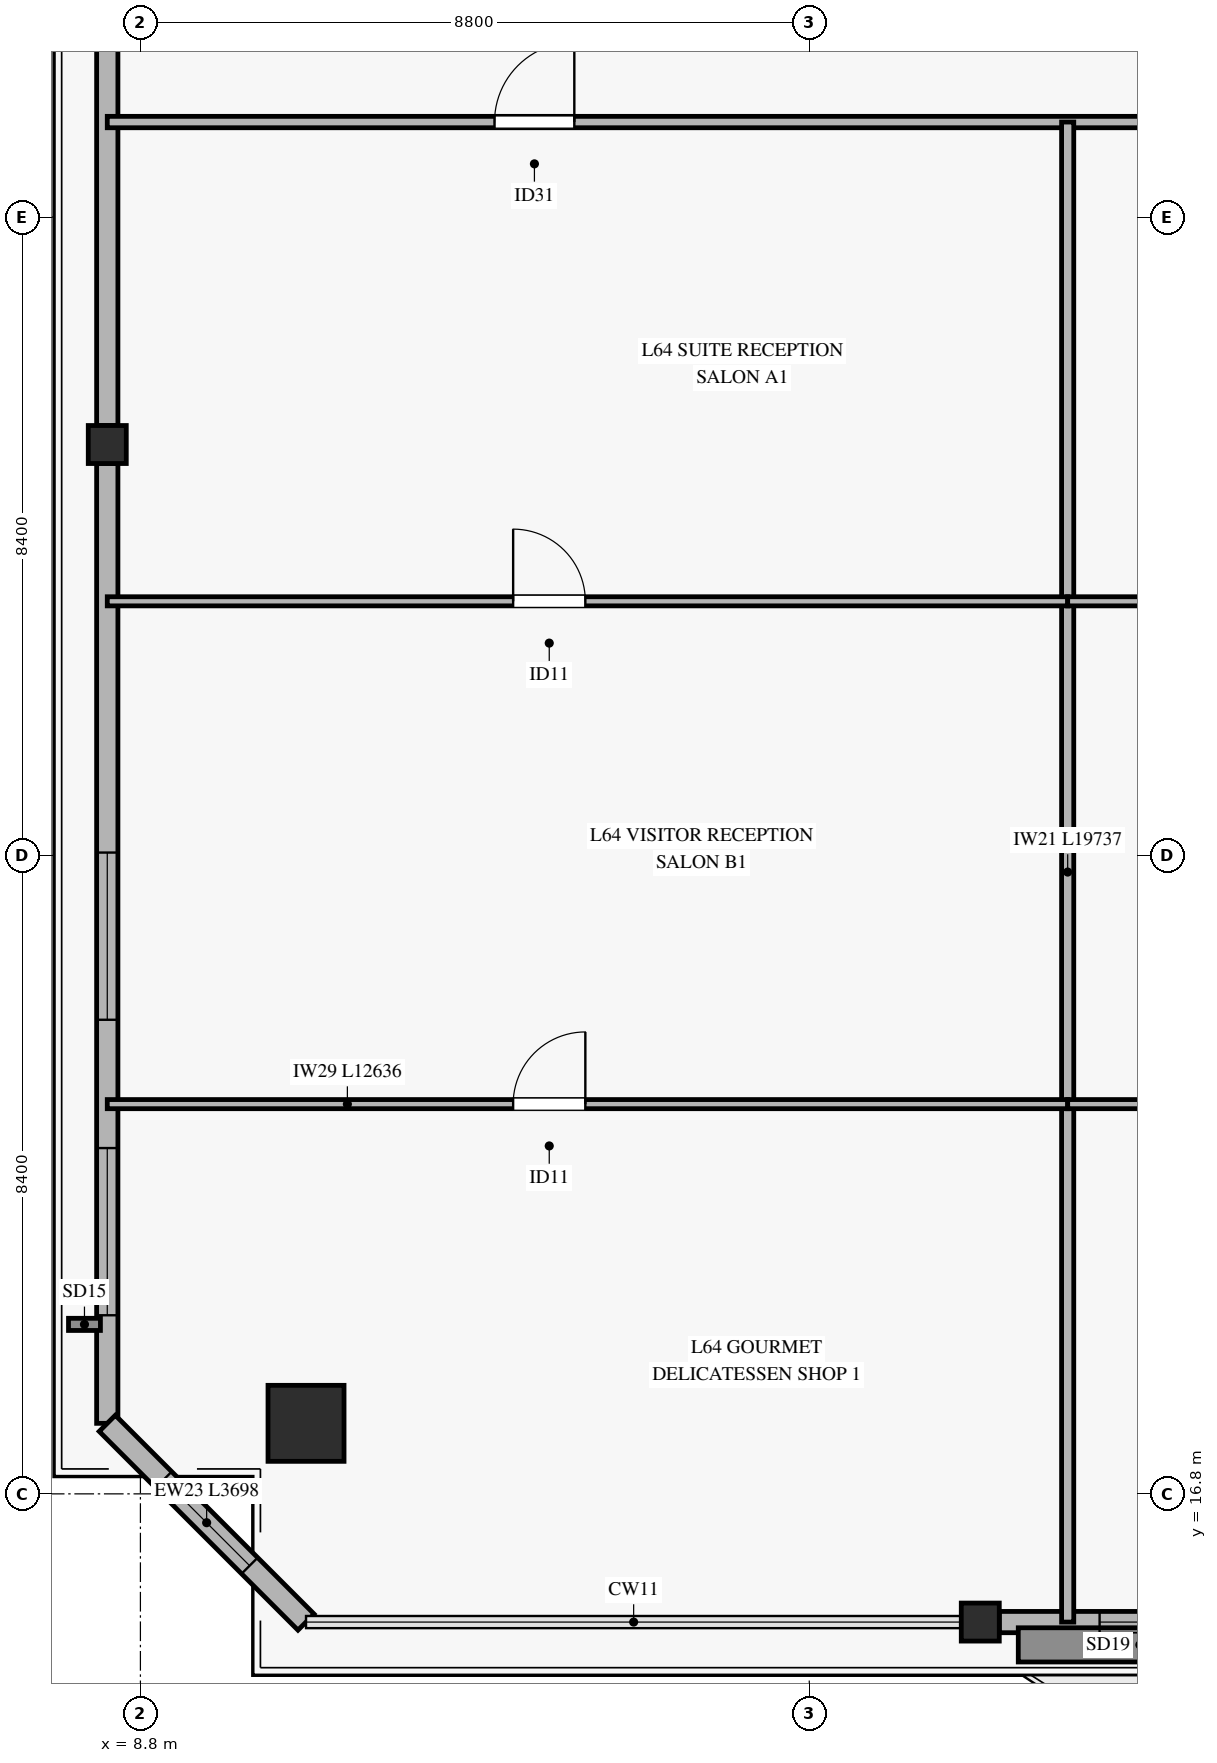
"""IFC4 building model, lengths in metres.
Left out: names, types, materials, properties, quantities, classifications, styles, units other than length and angle.
Written with IfcOpenShell. Run it as: python <this file> out.ifc"""

import sys

from ifc_helpers import new_model, si_unit, direction, frame, frame_2d, origin, origin_2d, place, context, subcontext, project, spatial, rectangle, hollow_rectangle, extrude, source, transform, mapped, element, fill, save


model = new_model("IFC4")
c1 = context("Model", 3, precision=1e-05, world=origin(), true_north=direction((0.0, 1.0)))
c2 = subcontext(c1, "Body", "Model", "MODEL_VIEW")
j1 = project(units=[si_unit("LENGTHUNIT", "METRE"), si_unit("PLANEANGLEUNIT", "RADIAN")], contexts=[c1])
p1 = place(None, origin())
s1 = spatial("IfcSite", under=j1, at=p1, CompositionType="ELEMENT")
p2 = place(p1, origin())
s2 = spatial("IfcBuilding", under=s1, at=p2, CompositionType="ELEMENT")
p3 = place(p2, frame((0.0, 0.0, 251.9)))
s3 = spatial("IfcBuildingStorey", under=s2, at=p3, CompositionType="ELEMENT", Elevation=251.9)
m1 = source(origin(), c2, "Body", "SweptSolid", [
    extrude(hollow_rectangle(XDim=1.0, YDim=1.0, WallThickness=0.045, at=origin_2d()), origin(), (0.0, 0.0, 1.0), 3.185),
])
p4 = place(p3, frame((10.979, 17.728, 0.0), z_axis=(0.0, 0.0, 1.0), x_axis=(1.0, 0.0, 0.0)))
e1 = element("IfcColumn", 1, at=p4, inside=s3, PredefinedType="COLUMN", context=c2, shape_type="MappedRepresentation", body=[
    mapped(m1, transform((0.0, 0.0, 0.0), x_axis=(1.0, 0.0, 0.0), y_axis=(0.0, 1.0, 0.0), z_axis=(0.0, 0.0, 1.0), scale=1.0)),
])
m2 = source(origin(), c2, "Body", "SweptSolid", [
    extrude(hollow_rectangle(XDim=0.5, YDim=0.5, WallThickness=0.024, at=origin_2d()), origin(), (0.0, 0.0, 1.0), 3.185),
])
for number, where, z_axis, x_axis in (
    (2, (19.85, 15.113, 0.0), (0.0, 0.0, 1.0), (1.0, 0.0, 0.0)),
    (3, (8.364, 30.607, 0.0), (0.0, 0.0, 1.0), (1.0, 0.0, 0.0)),
):
    element("IfcColumn", number, at=place(p3, frame(where, z_axis=z_axis, x_axis=x_axis)), inside=s3, PredefinedType="COLUMN", context=c2, shape_type="MappedRepresentation", body=[
        mapped(m2, transform((0.0, 0.0, 0.0), x_axis=(1.0, 0.0, 0.0), y_axis=(0.0, 1.0, 0.0), z_axis=(0.0, 0.0, 1.0), scale=1.0)),
    ])
p5 = place(p3, frame((20.1, 15.113, 0.0), z_axis=(0.0, 0.0, 1.0), x_axis=(1.0, 0.0, 0.0)))
e4 = element("IfcWall", 4, at=p5, inside=s3, PredefinedType="SOLIDWALL", context=c2, shape_type="SweptSolid", body=[
    extrude(rectangle(XDim=10.45, YDim=0.28, at=frame_2d((5.225, 0.0))), origin(), (0.0, 0.0, 1.0), 2.815),
])
p6 = place(p5, frame((4.3, 0.0, 0.0)))
e5 = element("IfcOpeningElement", 5, at=p6, cuts=e4, PredefinedType="OPENING", context=c2, shape_type="SweptSolid", body=[
    extrude(rectangle(XDim=1.8, YDim=2.25, at=frame_2d((0.9, 1.125))), frame((0.0, 0.15, 0.0), z_axis=(0.0, -1.0, 0.0), x_axis=(1.0, 0.0, 0.0)), (0.0, 0.0, 1.0), 0.3),
])
p7 = place(p5, frame((1.32, 0.0, 0.45)))
e6 = element("IfcOpeningElement", 6, at=p7, cuts=e4, PredefinedType="OPENING", context=c2, shape_type="SweptSolid", body=[
    extrude(rectangle(XDim=2.2, YDim=2.1, at=frame_2d((1.1, 1.05))), frame((0.0, 0.15, 0.0), z_axis=(0.0, -1.0, 0.0), x_axis=(1.0, 0.0, 0.0)), (0.0, 0.0, 1.0), 0.3),
])
p8 = place(p5, frame((7.35, 0.0, 0.45)))
e7 = element("IfcOpeningElement", 7, at=p8, cuts=e4, PredefinedType="OPENING", context=c2, shape_type="SweptSolid", body=[
    extrude(rectangle(XDim=1.6, YDim=2.0, at=frame_2d((0.8, 1.0))), frame((0.0, 0.15, 0.0), z_axis=(0.0, -1.0, 0.0), x_axis=(1.0, 0.0, 0.0)), (0.0, 0.0, 1.0), 0.3),
])
p9 = place(p3, frame((8.364, 17.728, 0.0), z_axis=(0.0, 0.0, 1.0), x_axis=(0.0, 1.0, 0.0)))
e8 = element("IfcWall", 8, at=p9, inside=s3, PredefinedType="SOLIDWALL", context=c2, shape_type="SweptSolid", body=[
    extrude(rectangle(XDim=12.629, YDim=0.28, at=frame_2d((6.314, 0.0))), origin(), (0.0, 0.0, 1.0), 2.815),
])
p10 = place(p9, frame((1.422, 0.0, 0.45)))
e9 = element("IfcOpeningElement", 9, at=p10, cuts=e8, PredefinedType="OPENING", context=c2, shape_type="SweptSolid", body=[
    extrude(rectangle(XDim=2.2, YDim=2.1, at=frame_2d((1.1, 1.05))), frame((0.0, 0.15, 0.0), z_axis=(0.0, -1.0, 0.0), x_axis=(1.0, 0.0, 0.0)), (0.0, 0.0, 1.0), 0.3),
])
p11 = place(p9, frame((5.31, 0.0, 0.45)))
e10 = element("IfcOpeningElement", 10, at=p11, cuts=e8, PredefinedType="OPENING", context=c2, shape_type="SweptSolid", body=[
    extrude(rectangle(XDim=2.2, YDim=2.1, at=frame_2d((1.1, 1.05))), frame((0.0, 0.15, 0.0), z_axis=(0.0, -1.0, 0.0), x_axis=(1.0, 0.0, 0.0)), (0.0, 0.0, 1.0), 0.3),
])
p12 = place(p3, frame((8.364, 30.857, 0.0), z_axis=(0.0, 0.0, 1.0), x_axis=(0.0, 1.0, 0.0)))
e11 = element("IfcWall", 11, at=p12, inside=s3, PredefinedType="SOLIDWALL", context=c2, shape_type="SweptSolid", body=[
    extrude(rectangle(XDim=12.628, YDim=0.28, at=frame_2d((6.314, 0.0))), origin(), (0.0, 0.0, 1.0), 2.815),
])
p13 = place(p12, frame((7.583, 0.0, 0.45)))
e12 = element("IfcOpeningElement", 12, at=p13, cuts=e11, PredefinedType="OPENING", context=c2, shape_type="SweptSolid", body=[
    extrude(rectangle(XDim=2.2, YDim=2.1, at=frame_2d((1.1, 1.05))), frame((0.0, 0.15, 0.0), z_axis=(0.0, -1.0, 0.0), x_axis=(1.0, 0.0, 0.0)), (0.0, 0.0, 1.0), 0.3),
])
p14 = place(p3, frame((8.364, 17.728, 0.0), z_axis=(0.0, 0.0, 1.0), x_axis=(0.707106781187, -0.707106781187, 0.0)))
e13 = element("IfcWall", 13, at=p14, inside=s3, PredefinedType="SOLIDWALL", context=c2, shape_type="SweptSolid", body=[
    extrude(rectangle(XDim=3.698, YDim=0.3, at=frame_2d((1.849, 0.0))), origin(), (0.0, 0.0, 1.0), 2.815),
])
p15 = place(p14, frame((1.049, 0.0, 0.45)))
e14 = element("IfcOpeningElement", 14, at=p15, cuts=e13, PredefinedType="OPENING", context=c2, shape_type="SweptSolid", body=[
    extrude(rectangle(XDim=1.6, YDim=2.0, at=frame_2d((0.8, 1.0))), frame((0.0, 0.16, 0.0), z_axis=(0.0, -1.0, 0.0), x_axis=(1.0, 0.0, 0.0)), (0.0, 0.0, 1.0), 0.32),
])
p16 = place(p3, frame((8.364, 34.85, 0.0), z_axis=(0.0, 0.0, 1.0), x_axis=(1.0, 0.0, 0.0)))
e15 = element("IfcWall", 15, at=p16, inside=s3, PredefinedType="PARTITIONING", context=c2, shape_type="SweptSolid", body=[
    extrude(rectangle(XDim=53.673, YDim=0.15, at=frame_2d((26.836, 0.0))), origin(), (0.0, 0.0, 1.0), 2.47),
])
p17 = place(p16, frame((5.095, 0.0, 0.0)))
e16 = element("IfcOpeningElement", 16, at=p17, cuts=e15, PredefinedType="OPENING", context=c2, shape_type="SweptSolid", body=[
    extrude(rectangle(XDim=1.05, YDim=2.15, at=frame_2d((0.525, 1.075))), frame((0.0, 0.085, 0.0), z_axis=(0.0, -1.0, 0.0), x_axis=(1.0, 0.0, 0.0)), (0.0, 0.0, 1.0), 0.17),
])
p18 = place(p16, frame((17.517, 0.0, 0.0)))
e17 = element("IfcOpeningElement", 17, at=p18, cuts=e15, PredefinedType="OPENING", context=c2, shape_type="SweptSolid", body=[
    extrude(rectangle(XDim=1.05, YDim=2.15, at=frame_2d((0.525, 1.075))), frame((0.0, 0.085, 0.0), z_axis=(0.0, -1.0, 0.0), x_axis=(1.0, 0.0, 0.0)), (0.0, 0.0, 1.0), 0.17),
])
p19 = place(p16, frame((29.537, 0.0, 0.0)))
e18 = element("IfcOpeningElement", 18, at=p19, cuts=e15, PredefinedType="OPENING", context=c2, shape_type="SweptSolid", body=[
    extrude(rectangle(XDim=1.05, YDim=2.15, at=frame_2d((0.525, 1.075))), frame((0.0, 0.085, 0.0), z_axis=(0.0, -1.0, 0.0), x_axis=(1.0, 0.0, 0.0)), (0.0, 0.0, 1.0), 0.17),
])
p20 = place(p16, frame((43.079, 0.0, 0.0)))
e19 = element("IfcOpeningElement", 19, at=p20, cuts=e15, PredefinedType="OPENING", context=c2, shape_type="SweptSolid", body=[
    extrude(rectangle(XDim=1.05, YDim=2.15, at=frame_2d((0.525, 1.075))), frame((0.0, 0.085, 0.0), z_axis=(0.0, -1.0, 0.0), x_axis=(1.0, 0.0, 0.0)), (0.0, 0.0, 1.0), 0.17),
])
p21 = place(p3, frame((21.0, 15.113, 0.0), z_axis=(0.0, 0.0, 1.0), x_axis=(0.0, 1.0, 0.0)))
e20 = element("IfcWall", 20, at=p21, inside=s3, PredefinedType="PARTITIONING", context=c2, shape_type="SweptSolid", body=[
    extrude(rectangle(XDim=19.737, YDim=0.16, at=frame_2d((9.869, 0.0))), origin(), (0.0, 0.0, 1.0), 2.77),
])
p22 = place(p3, frame((8.364, 21.928, 0.0), z_axis=(0.0, 0.0, 1.0), x_axis=(1.0, 0.0, 0.0)))
e21 = element("IfcWall", 21, at=p22, inside=s3, PredefinedType="PARTITIONING", context=c2, shape_type="SweptSolid", body=[
    extrude(rectangle(XDim=12.636, YDim=0.12, at=frame_2d((6.318, 0.0))), origin(), (0.0, 0.0, 1.0), 2.47),
])
p23 = place(p22, frame((5.34, 0.0, 0.0)))
e22 = element("IfcOpeningElement", 22, at=p23, cuts=e21, PredefinedType="OPENING", context=c2, shape_type="SweptSolid", body=[
    extrude(rectangle(XDim=0.95, YDim=2.1, at=frame_2d((0.475, 1.05))), frame((0.0, 0.07, 0.0), z_axis=(0.0, -1.0, 0.0), x_axis=(1.0, 0.0, 0.0)), (0.0, 0.0, 1.0), 0.14),
])
p24 = place(p3, frame((8.364, 28.544, 0.0), z_axis=(0.0, 0.0, 1.0), x_axis=(1.0, 0.0, 0.0)))
e23 = element("IfcWall", 23, at=p24, inside=s3, PredefinedType="PARTITIONING", context=c2, shape_type="SweptSolid", body=[
    extrude(rectangle(XDim=12.636, YDim=0.12, at=frame_2d((6.318, 0.0))), origin(), (0.0, 0.0, 1.0), 2.47),
])
p25 = place(p24, frame((5.34, 0.0, 0.0)))
e24 = element("IfcOpeningElement", 24, at=p25, cuts=e23, PredefinedType="OPENING", context=c2, shape_type="SweptSolid", body=[
    extrude(rectangle(XDim=0.95, YDim=2.1, at=frame_2d((0.475, 1.05))), frame((0.0, 0.07, 0.0), z_axis=(0.0, -1.0, 0.0), x_axis=(1.0, 0.0, 0.0)), (0.0, 0.0, 1.0), 0.14),
])
p26 = place(p3, frame((21.0, 21.928, 0.0), z_axis=(0.0, 0.0, 1.0), x_axis=(1.0, 0.0, 0.0)))
e25 = element("IfcWall", 25, at=p26, inside=s3, PredefinedType="PARTITIONING", context=c2, shape_type="SweptSolid", body=[
    extrude(rectangle(XDim=12.4, YDim=0.12, at=frame_2d((6.2, 0.0))), origin(), (0.0, 0.0, 1.0), 2.47),
])
p27 = place(p26, frame((5.126, 0.0, 0.0)))
e26 = element("IfcOpeningElement", 26, at=p27, cuts=e25, PredefinedType="OPENING", context=c2, shape_type="SweptSolid", body=[
    extrude(rectangle(XDim=0.95, YDim=2.1, at=frame_2d((0.475, 1.05))), frame((0.0, 0.07, 0.0), z_axis=(0.0, -1.0, 0.0), x_axis=(1.0, 0.0, 0.0)), (0.0, 0.0, 1.0), 0.14),
])
p28 = place(p3, frame((21.0, 28.544, 0.0), z_axis=(0.0, 0.0, 1.0), x_axis=(1.0, 0.0, 0.0)))
e27 = element("IfcWall", 27, at=p28, inside=s3, PredefinedType="PARTITIONING", context=c2, shape_type="SweptSolid", body=[
    extrude(rectangle(XDim=12.4, YDim=0.12, at=frame_2d((6.2, 0.0))), origin(), (0.0, 0.0, 1.0), 2.47),
])
p29 = place(p28, frame((5.126, 0.0, 0.0)))
e28 = element("IfcOpeningElement", 28, at=p29, cuts=e27, PredefinedType="OPENING", context=c2, shape_type="SweptSolid", body=[
    extrude(rectangle(XDim=0.95, YDim=2.1, at=frame_2d((0.475, 1.05))), frame((0.0, 0.07, 0.0), z_axis=(0.0, -1.0, 0.0), x_axis=(1.0, 0.0, 0.0)), (0.0, 0.0, 1.0), 0.14),
])
m3 = source(origin(), c2, "Body", "SweptSolid", [
    extrude(rectangle(XDim=2.2, YDim=2.1, at=frame_2d((1.1, 1.05))), frame((0.0, 0.03, 0.0), z_axis=(0.0, -1.0, 0.0), x_axis=(1.0, 0.0, 0.0)), (0.0, 0.0, 1.0), 0.06),
])
p30 = place(p7, origin())
e29 = element("IfcWindow", 29, at=p30, inside=s3, PartitioningType="SINGLE_PANEL", PredefinedType="WINDOW", context=c2, shape_type="MappedRepresentation", body=[
    mapped(m3, transform((0.0, 0.0, 0.0), x_axis=(1.0, 0.0, 0.0), y_axis=(0.0, 1.0, 0.0), z_axis=(0.0, 0.0, 1.0), scale=1.0)),
])
fill(e6, e29)
p31 = place(p10, origin())
e30 = element("IfcWindow", 30, at=p31, inside=s3, PartitioningType="SINGLE_PANEL", PredefinedType="WINDOW", context=c2, shape_type="MappedRepresentation", body=[
    mapped(m3, transform((0.0, 0.0, 0.0), x_axis=(1.0, 0.0, 0.0), y_axis=(0.0, 1.0, 0.0), z_axis=(0.0, 0.0, 1.0), scale=1.0)),
])
fill(e9, e30)
p32 = place(p11, origin())
e31 = element("IfcWindow", 31, at=p32, inside=s3, PartitioningType="SINGLE_PANEL", PredefinedType="WINDOW", context=c2, shape_type="MappedRepresentation", body=[
    mapped(m3, transform((0.0, 0.0, 0.0), x_axis=(1.0, 0.0, 0.0), y_axis=(0.0, 1.0, 0.0), z_axis=(0.0, 0.0, 1.0), scale=1.0)),
])
fill(e10, e31)
m4 = source(origin(), c2, "Body", "SweptSolid", [
    extrude(rectangle(XDim=1.6, YDim=2.0, at=frame_2d((0.8, 1.0))), frame((0.0, 0.03, 0.0), z_axis=(0.0, -1.0, 0.0), x_axis=(1.0, 0.0, 0.0)), (0.0, 0.0, 1.0), 0.06),
])
p33 = place(p15, origin())
e32 = element("IfcWindow", 32, at=p33, inside=s3, PartitioningType="SINGLE_PANEL", PredefinedType="WINDOW", context=c2, shape_type="MappedRepresentation", body=[
    mapped(m4, transform((0.0, 0.0, 0.0), x_axis=(1.0, 0.0, 0.0), y_axis=(0.0, 1.0, 0.0), z_axis=(0.0, 0.0, 1.0), scale=1.0)),
])
fill(e14, e32)
m5 = source(origin(), c2, "Body", "SweptSolid", [
    extrude(rectangle(XDim=1.05, YDim=2.15, at=frame_2d((0.525, 1.075))), frame((0.0, 0.025, 0.0), z_axis=(0.0, -1.0, 0.0), x_axis=(1.0, 0.0, 0.0)), (0.0, 0.0, 1.0), 0.05),
])
p34 = place(p17, origin())
e33 = element("IfcDoor", 33, at=p34, inside=s3, OperationType="SINGLE_SWING_RIGHT", PredefinedType="DOOR", context=c2, shape_type="MappedRepresentation", body=[
    mapped(m5, transform((0.0, 0.0, 0.0), x_axis=(1.0, 0.0, 0.0), y_axis=(0.0, 1.0, 0.0), z_axis=(0.0, 0.0, 1.0), scale=1.0)),
])
fill(e16, e33)
m6 = source(origin(), c2, "Body", "SweptSolid", [
    extrude(rectangle(XDim=0.95, YDim=2.1, at=frame_2d((0.475, 1.05))), frame((0.0, 0.025, 0.0), z_axis=(0.0, -1.0, 0.0), x_axis=(1.0, 0.0, 0.0)), (0.0, 0.0, 1.0), 0.05),
])
p35 = place(p25, origin())
e34 = element("IfcDoor", 34, at=p35, inside=s3, OperationType="SINGLE_SWING_LEFT", PredefinedType="DOOR", context=c2, shape_type="MappedRepresentation", body=[
    mapped(m6, transform((0.0, 0.0, 0.0), x_axis=(1.0, 0.0, 0.0), y_axis=(0.0, 1.0, 0.0), z_axis=(0.0, 0.0, 1.0), scale=1.0)),
])
fill(e24, e34)
p36 = place(p23, origin())
e35 = element("IfcDoor", 35, at=p36, inside=s3, OperationType="SINGLE_SWING_RIGHT", PredefinedType="DOOR", context=c2, shape_type="MappedRepresentation", body=[
    mapped(m6, transform((0.0, 0.0, 0.0), x_axis=(1.0, 0.0, 0.0), y_axis=(0.0, 1.0, 0.0), z_axis=(0.0, 0.0, 1.0), scale=1.0)),
])
fill(e22, e35)
save(model, sys.argv[1])
